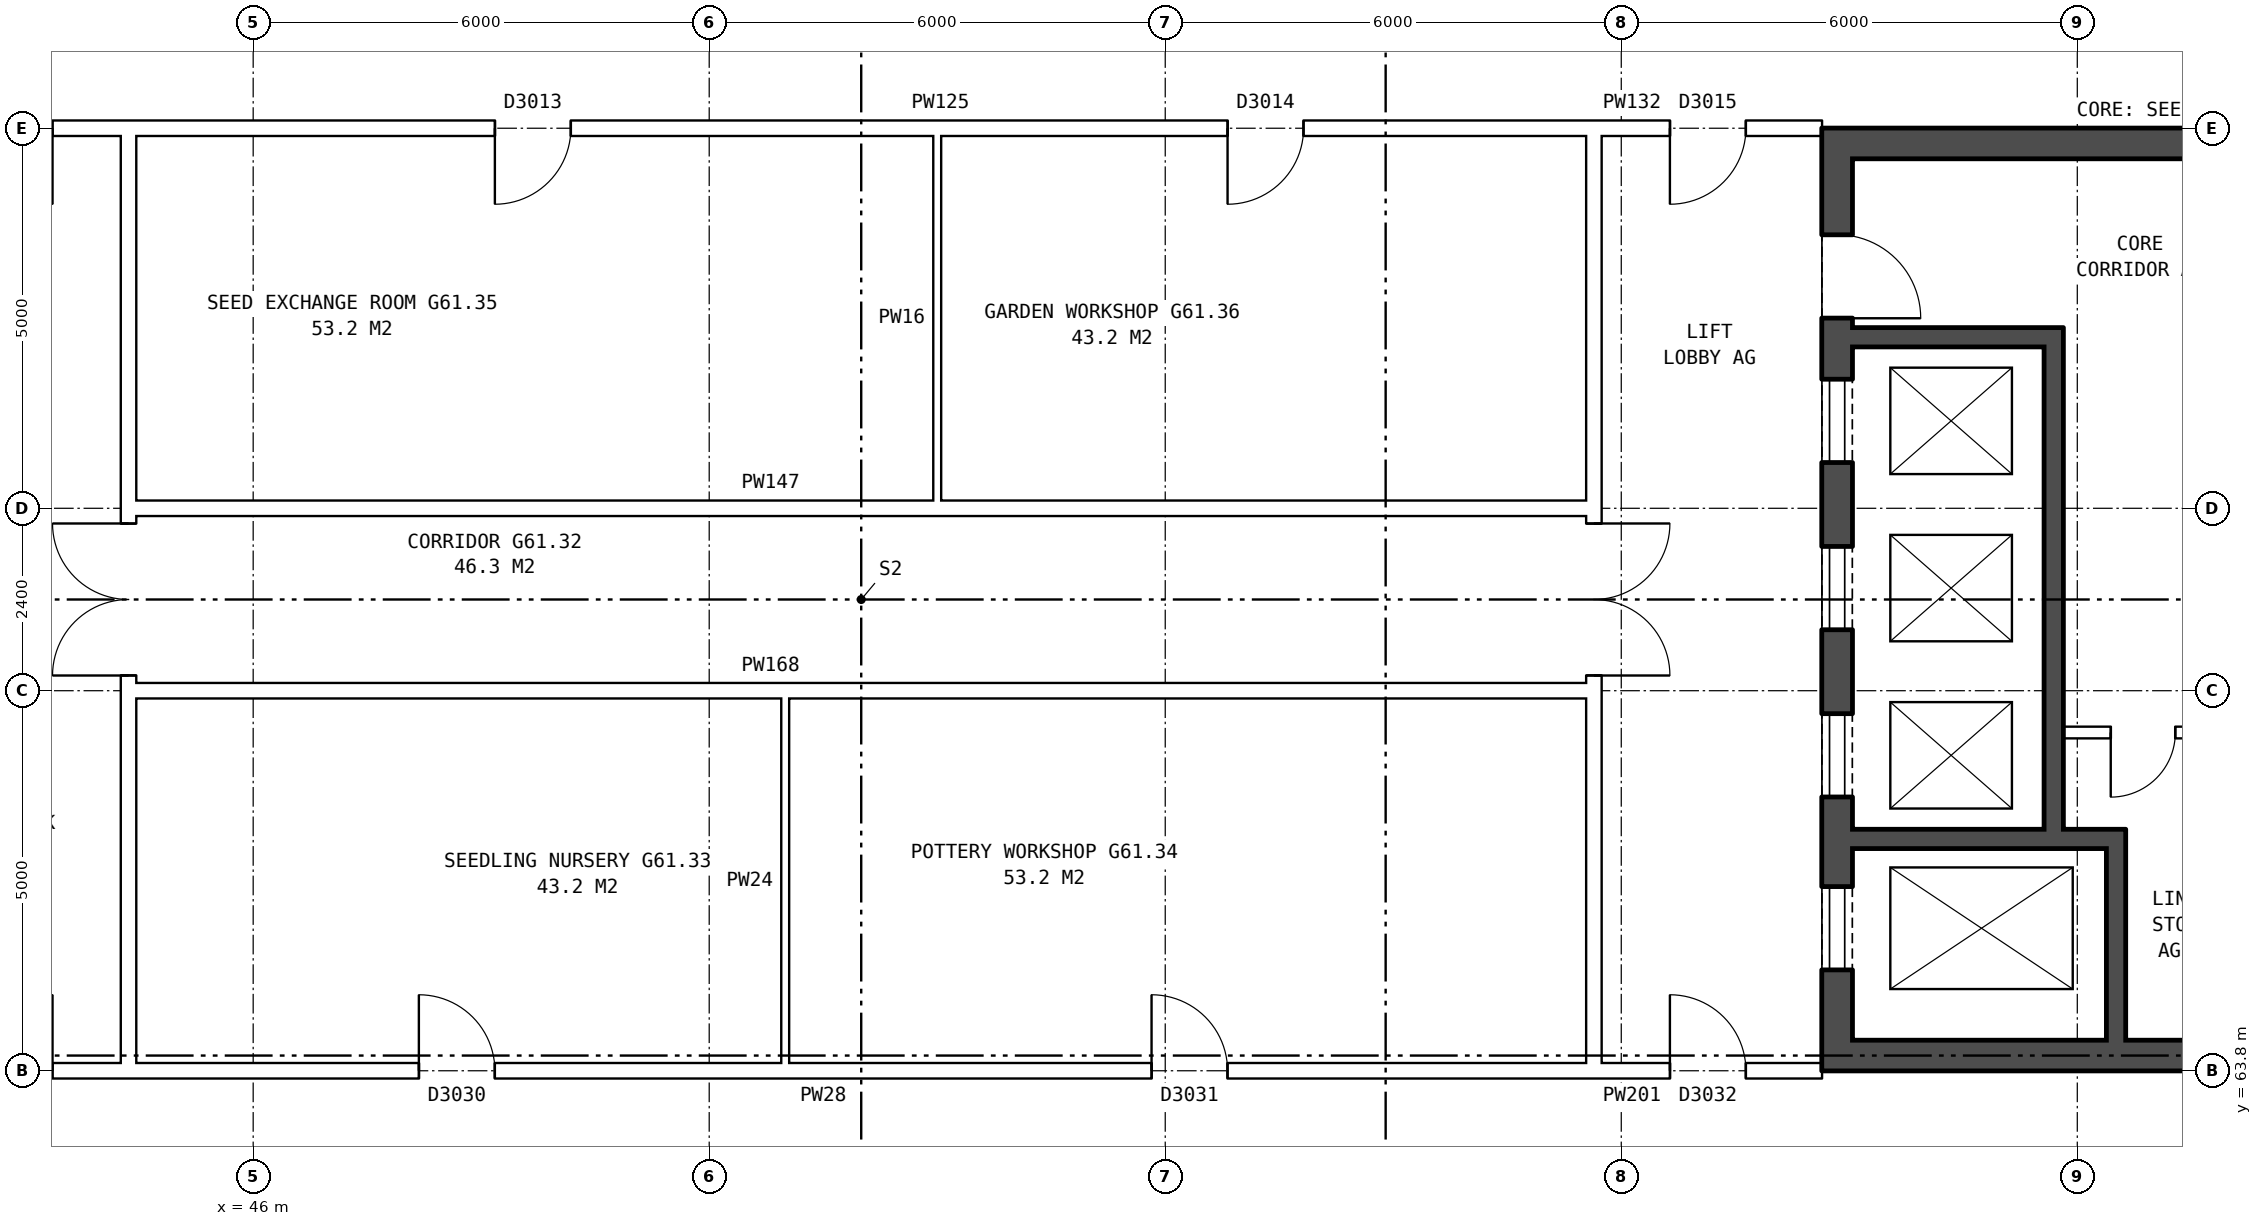
"""IFC4 building model, lengths in metres.
Left out: names, types, materials, properties, quantities, classifications, styles, units other than length and angle.
Written with IfcOpenShell. Run it as: python <this file> out.ifc"""

import sys

from ifc_helpers import new_model, si_unit, direction, frame, frame_2d, origin, place, context, subcontext, project, spatial, rectangle, extrude, element, fill, save


model = new_model("IFC4")
c1 = context("Model", 3, precision=1e-05, world=origin(), true_north=direction((0.0, 1.0)))
c2 = subcontext(c1, "Body", "Model", "MODEL_VIEW")
j1 = project(units=[si_unit("LENGTHUNIT", "METRE"), si_unit("PLANEANGLEUNIT", "RADIAN")], contexts=[c1])
p1 = place(None, origin())
s1 = spatial("IfcSite", under=j1, at=p1, CompositionType="ELEMENT")
p2 = place(p1, origin())
s2 = spatial("IfcBuilding", under=s1, at=p2, CompositionType="ELEMENT")
p3 = place(p2, frame((0.0, 0.0, 215.2)))
s3 = spatial("IfcBuildingStorey", under=s2, at=p3, CompositionType="ELEMENT", Elevation=215.2)
p4 = place(p3, frame((66.84, 63.8, 0.0), z_axis=(0.0, 0.0, 1.0), x_axis=(0.0, 1.0, 0.0)))
e1 = element("IfcWall", 1, at=p4, inside=s3, PredefinedType="SHEAR", context=c2, shape_type="SweptSolid", body=[
    extrude(rectangle(XDim=12.4, YDim=0.4, at=frame_2d((6.2, 0.0))), origin(), (0.0, 0.0, 1.0), 5.6),
])
p5 = place(p4, frame((1.325, 0.0, 0.0)))
e2 = element("IfcOpeningElement", 2, at=p5, cuts=e1, PredefinedType="OPENING", context=c2, shape_type="SweptSolid", body=[
    extrude(rectangle(XDim=1.1, YDim=2.1, at=frame_2d((0.55, 1.05))), frame((0.0, 0.21, 0.0), z_axis=(0.0, -1.0, 0.0), x_axis=(1.0, 0.0, 0.0)), (0.0, 0.0, 1.0), 0.42),
])
p6 = place(p4, frame((3.6, 0.0, 0.0)))
e3 = element("IfcOpeningElement", 3, at=p6, cuts=e1, PredefinedType="OPENING", context=c2, shape_type="SweptSolid", body=[
    extrude(rectangle(XDim=1.1, YDim=2.1, at=frame_2d((0.55, 1.05))), frame((0.0, 0.21, 0.0), z_axis=(0.0, -1.0, 0.0), x_axis=(1.0, 0.0, 0.0)), (0.0, 0.0, 1.0), 0.42),
])
p7 = place(p4, frame((5.8, 0.0, 0.0)))
e4 = element("IfcOpeningElement", 4, at=p7, cuts=e1, PredefinedType="OPENING", context=c2, shape_type="SweptSolid", body=[
    extrude(rectangle(XDim=1.1, YDim=2.1, at=frame_2d((0.55, 1.05))), frame((0.0, 0.21, 0.0), z_axis=(0.0, -1.0, 0.0), x_axis=(1.0, 0.0, 0.0)), (0.0, 0.0, 1.0), 0.42),
])
p8 = place(p4, frame((8.0, 0.0, 0.0)))
e5 = element("IfcOpeningElement", 5, at=p8, cuts=e1, PredefinedType="OPENING", context=c2, shape_type="SweptSolid", body=[
    extrude(rectangle(XDim=1.1, YDim=2.1, at=frame_2d((0.55, 1.05))), frame((0.0, 0.21, 0.0), z_axis=(0.0, -1.0, 0.0), x_axis=(1.0, 0.0, 0.0)), (0.0, 0.0, 1.0), 0.42),
])
p9 = place(p4, frame((9.9, 0.0, 0.0)))
e6 = element("IfcOpeningElement", 6, at=p9, cuts=e1, PredefinedType="OPENING", context=c2, shape_type="SweptSolid", body=[
    extrude(rectangle(XDim=1.1, YDim=2.1, at=frame_2d((0.55, 1.05))), frame((0.0, 0.21, 0.0), z_axis=(0.0, -1.0, 0.0), x_axis=(1.0, 0.0, 0.0)), (0.0, 0.0, 1.0), 0.42),
])
for number, where, z_axis, x_axis in (
    (7, (67.04, 64.0, 0.0), (0.0, 0.0, 1.0), (1.0, 0.0, 0.0)),
    (8, (67.04, 76.0, 0.0), (0.0, 0.0, 1.0), (1.0, 0.0, 0.0)),
):
    element("IfcWall", number, at=place(p3, frame(where, z_axis=z_axis, x_axis=x_axis)), inside=s3, PredefinedType="SHEAR", context=c2, shape_type="SweptSolid", body=[
        extrude(rectangle(XDim=8.2, YDim=0.4, at=frame_2d((4.1, 0.0))), origin(), (0.0, 0.0, 1.0), 5.6),
    ])
p10 = place(p3, frame((67.04, 66.85, 0.0), z_axis=(0.0, 0.0, 1.0), x_axis=(1.0, 0.0, 0.0)))
e9 = element("IfcWall", 9, at=p10, inside=s3, PredefinedType="SHEAR", context=c2, shape_type="SweptSolid", body=[
    extrude(rectangle(XDim=3.595, YDim=0.25, at=frame_2d((1.797, 0.0))), origin(), (0.0, 0.0, 1.0), 5.6),
])
p11 = place(p3, frame((69.815, 68.25, 0.0), z_axis=(0.0, 0.0, 1.0), x_axis=(1.0, 0.0, 0.0)))
e10 = element("IfcWall", 10, at=p11, inside=s3, PredefinedType="PARTITIONING", context=c2, shape_type="SweptSolid", body=[
    extrude(rectangle(XDim=2.1, YDim=0.15, at=frame_2d((1.05, 0.0))), origin(), (0.0, 0.0, 1.0), 5.6),
])
p12 = place(p11, frame((0.625, 0.0, 0.0)))
e11 = element("IfcOpeningElement", 11, at=p12, cuts=e10, PredefinedType="OPENING", context=c2, shape_type="SweptSolid", body=[
    extrude(rectangle(XDim=0.85, YDim=2.1, at=frame_2d((0.425, 1.05))), frame((0.0, 0.085, 0.0), z_axis=(0.0, -1.0, 0.0), x_axis=(1.0, 0.0, 0.0)), (0.0, 0.0, 1.0), 0.17),
])
p13 = place(p3, frame((67.04, 73.45, 0.0), z_axis=(0.0, 0.0, 1.0), x_axis=(1.0, 0.0, 0.0)))
e12 = element("IfcWall", 12, at=p13, inside=s3, PredefinedType="SHEAR", context=c2, shape_type="SweptSolid", body=[
    extrude(rectangle(XDim=2.525, YDim=0.25, at=frame_2d((1.262, 0.0))), origin(), (0.0, 0.0, 1.0), 5.6),
])
p14 = place(p3, frame((69.69, 66.975, 0.0), z_axis=(0.0, 0.0, 1.0), x_axis=(0.0, 1.0, 0.0)))
e13 = element("IfcWall", 13, at=p14, inside=s3, PredefinedType="SHEAR", context=c2, shape_type="SweptSolid", body=[
    extrude(rectangle(XDim=6.6, YDim=0.25, at=frame_2d((3.3, 0.0))), origin(), (0.0, 0.0, 1.0), 5.6),
])
p15 = place(p3, frame((70.51, 64.2, 0.0), z_axis=(0.0, 0.0, 1.0), x_axis=(0.0, 1.0, 0.0)))
e14 = element("IfcWall", 14, at=p15, inside=s3, PredefinedType="SHEAR", context=c2, shape_type="SweptSolid", body=[
    extrude(rectangle(XDim=2.525, YDim=0.25, at=frame_2d((1.263, 0.0))), origin(), (0.0, 0.0, 1.0), 5.6),
])
p16 = place(p3, frame((63.64, 63.9, 0.0), z_axis=(0.0, 0.0, 1.0), x_axis=(0.0, 1.0, 0.0)))
e15 = element("IfcWall", 15, at=p16, inside=s3, PredefinedType="PARTITIONING", context=c2, shape_type="SweptSolid", body=[
    extrude(rectangle(XDim=12.2, YDim=0.2, at=frame_2d((6.1, 0.0))), origin(), (0.0, 0.0, 1.0), 5.6),
])
p17 = place(p16, frame((5.1, 0.0, 0.0)))
e16 = element("IfcOpeningElement", 16, at=p17, cuts=e15, PredefinedType="OPENING", context=c2, shape_type="SweptSolid", body=[
    extrude(rectangle(XDim=2.0, YDim=2.1, at=frame_2d((1.0, 1.05))), frame((0.0, 0.11, 0.0), z_axis=(0.0, -1.0, 0.0), x_axis=(1.0, 0.0, 0.0)), (0.0, 0.0, 1.0), 0.22),
])
p18 = place(p3, frame((44.36, 63.9, 0.0), z_axis=(0.0, 0.0, 1.0), x_axis=(0.0, 1.0, 0.0)))
e17 = element("IfcWall", 17, at=p18, inside=s3, PredefinedType="PARTITIONING", context=c2, shape_type="SweptSolid", body=[
    extrude(rectangle(XDim=12.2, YDim=0.2, at=frame_2d((6.1, 0.0))), origin(), (0.0, 0.0, 1.0), 5.6),
])
p19 = place(p18, frame((5.1, 0.0, 0.0)))
e18 = element("IfcOpeningElement", 18, at=p19, cuts=e17, PredefinedType="OPENING", context=c2, shape_type="SweptSolid", body=[
    extrude(rectangle(XDim=2.0, YDim=2.1, at=frame_2d((1.0, 1.05))), frame((0.0, 0.11, 0.0), z_axis=(0.0, -1.0, 0.0), x_axis=(1.0, 0.0, 0.0)), (0.0, 0.0, 1.0), 0.22),
])
p20 = place(p3, frame((44.36, 63.8, 0.0), z_axis=(0.0, 0.0, 1.0), x_axis=(1.0, 0.0, 0.0)))
e19 = element("IfcWall", 19, at=p20, inside=s3, PredefinedType="PARTITIONING", context=c2, shape_type="SweptSolid", body=[
    extrude(rectangle(XDim=19.28, YDim=0.2, at=frame_2d((9.64, 0.0))), origin(), (0.0, 0.0, 1.0), 5.6),
])
p21 = place(p20, frame((3.82, 0.0, 0.0)))
e20 = element("IfcOpeningElement", 20, at=p21, cuts=e19, PredefinedType="OPENING", context=c2, shape_type="SweptSolid", body=[
    extrude(rectangle(XDim=1.0, YDim=2.1, at=frame_2d((0.5, 1.05))), frame((0.0, 0.11, 0.0), z_axis=(0.0, -1.0, 0.0), x_axis=(1.0, 0.0, 0.0)), (0.0, 0.0, 1.0), 0.22),
])
p22 = place(p20, frame((13.46, 0.0, 0.0)))
e21 = element("IfcOpeningElement", 21, at=p22, cuts=e19, PredefinedType="OPENING", context=c2, shape_type="SweptSolid", body=[
    extrude(rectangle(XDim=1.0, YDim=2.1, at=frame_2d((0.5, 1.05))), frame((0.0, 0.11, 0.0), z_axis=(0.0, -1.0, 0.0), x_axis=(1.0, 0.0, 0.0)), (0.0, 0.0, 1.0), 0.22),
])
p23 = place(p3, frame((41.36, 63.8, 0.0), z_axis=(0.0, 0.0, 1.0), x_axis=(1.0, 0.0, 0.0)))
e22 = element("IfcWall", 22, at=p23, inside=s3, PredefinedType="PARTITIONING", context=c2, shape_type="SweptSolid", body=[
    extrude(rectangle(XDim=3.0, YDim=0.2, at=frame_2d((1.5, 0.0))), origin(), (0.0, 0.0, 1.0), 5.6),
])
p24 = place(p23, frame((1.0, 0.0, 0.0)))
e23 = element("IfcOpeningElement", 23, at=p24, cuts=e22, PredefinedType="OPENING", context=c2, shape_type="SweptSolid", body=[
    extrude(rectangle(XDim=1.0, YDim=2.1, at=frame_2d((0.5, 1.05))), frame((0.0, 0.11, 0.0), z_axis=(0.0, -1.0, 0.0), x_axis=(1.0, 0.0, 0.0)), (0.0, 0.0, 1.0), 0.22),
])
p25 = place(p3, frame((63.64, 63.8, 0.0), z_axis=(0.0, 0.0, 1.0), x_axis=(1.0, 0.0, 0.0)))
e24 = element("IfcWall", 24, at=p25, inside=s3, PredefinedType="PARTITIONING", context=c2, shape_type="SweptSolid", body=[
    extrude(rectangle(XDim=3.0, YDim=0.2, at=frame_2d((1.5, 0.0))), origin(), (0.0, 0.0, 1.0), 5.6),
])
p26 = place(p25, frame((1.0, 0.0, 0.0)))
e25 = element("IfcOpeningElement", 25, at=p26, cuts=e24, PredefinedType="OPENING", context=c2, shape_type="SweptSolid", body=[
    extrude(rectangle(XDim=1.0, YDim=2.1, at=frame_2d((0.5, 1.05))), frame((0.0, 0.11, 0.0), z_axis=(0.0, -1.0, 0.0), x_axis=(1.0, 0.0, 0.0)), (0.0, 0.0, 1.0), 0.22),
])
for number, where, z_axis, x_axis in (
    (26, (44.36, 68.8, 0.0), (0.0, 0.0, 1.0), (1.0, 0.0, 0.0)),
    (27, (44.36, 71.2, 0.0), (0.0, 0.0, 1.0), (1.0, 0.0, 0.0)),
):
    element("IfcWall", number, at=place(p3, frame(where, z_axis=z_axis, x_axis=x_axis)), inside=s3, PredefinedType="PARTITIONING", context=c2, shape_type="SweptSolid", body=[
        extrude(rectangle(XDim=19.28, YDim=0.2, at=frame_2d((9.64, 0.0))), origin(), (0.0, 0.0, 1.0), 5.6),
    ])
p27 = place(p3, frame((44.36, 76.2, 0.0), z_axis=(0.0, 0.0, 1.0), x_axis=(1.0, 0.0, 0.0)))
e28 = element("IfcWall", 28, at=p27, inside=s3, PredefinedType="PARTITIONING", context=c2, shape_type="SweptSolid", body=[
    extrude(rectangle(XDim=19.28, YDim=0.2, at=frame_2d((9.64, 0.0))), origin(), (0.0, 0.0, 1.0), 5.6),
])
p28 = place(p27, frame((4.82, 0.0, 0.0)))
e29 = element("IfcOpeningElement", 29, at=p28, cuts=e28, PredefinedType="OPENING", context=c2, shape_type="SweptSolid", body=[
    extrude(rectangle(XDim=1.0, YDim=2.1, at=frame_2d((0.5, 1.05))), frame((0.0, 0.11, 0.0), z_axis=(0.0, -1.0, 0.0), x_axis=(1.0, 0.0, 0.0)), (0.0, 0.0, 1.0), 0.22),
])
p29 = place(p27, frame((14.46, 0.0, 0.0)))
e30 = element("IfcOpeningElement", 30, at=p29, cuts=e28, PredefinedType="OPENING", context=c2, shape_type="SweptSolid", body=[
    extrude(rectangle(XDim=1.0, YDim=2.1, at=frame_2d((0.5, 1.05))), frame((0.0, 0.11, 0.0), z_axis=(0.0, -1.0, 0.0), x_axis=(1.0, 0.0, 0.0)), (0.0, 0.0, 1.0), 0.22),
])
p30 = place(p3, frame((41.36, 76.2, 0.0), z_axis=(0.0, 0.0, 1.0), x_axis=(1.0, 0.0, 0.0)))
e31 = element("IfcWall", 31, at=p30, inside=s3, PredefinedType="PARTITIONING", context=c2, shape_type="SweptSolid", body=[
    extrude(rectangle(XDim=3.0, YDim=0.2, at=frame_2d((1.5, 0.0))), origin(), (0.0, 0.0, 1.0), 5.6),
])
p31 = place(p30, frame((1.0, 0.0, 0.0)))
e32 = element("IfcOpeningElement", 32, at=p31, cuts=e31, PredefinedType="OPENING", context=c2, shape_type="SweptSolid", body=[
    extrude(rectangle(XDim=1.0, YDim=2.1, at=frame_2d((0.5, 1.05))), frame((0.0, 0.11, 0.0), z_axis=(0.0, -1.0, 0.0), x_axis=(1.0, 0.0, 0.0)), (0.0, 0.0, 1.0), 0.22),
])
p32 = place(p3, frame((63.64, 76.2, 0.0), z_axis=(0.0, 0.0, 1.0), x_axis=(1.0, 0.0, 0.0)))
e33 = element("IfcWall", 33, at=p32, inside=s3, PredefinedType="PARTITIONING", context=c2, shape_type="SweptSolid", body=[
    extrude(rectangle(XDim=3.0, YDim=0.2, at=frame_2d((1.5, 0.0))), origin(), (0.0, 0.0, 1.0), 5.6),
])
p33 = place(p32, frame((1.0, 0.0, 0.0)))
e34 = element("IfcOpeningElement", 34, at=p33, cuts=e33, PredefinedType="OPENING", context=c2, shape_type="SweptSolid", body=[
    extrude(rectangle(XDim=1.0, YDim=2.1, at=frame_2d((0.5, 1.05))), frame((0.0, 0.11, 0.0), z_axis=(0.0, -1.0, 0.0), x_axis=(1.0, 0.0, 0.0)), (0.0, 0.0, 1.0), 0.22),
])
for number, where, z_axis, x_axis in (
    (35, (53.0, 63.7, 0.0), (0.0, 0.0, 1.0), (0.0, 1.0, 0.0)),
    (36, (55.0, 71.1, 0.0), (0.0, 0.0, 1.0), (0.0, 1.0, 0.0)),
):
    element("IfcWall", number, at=place(p3, frame(where, z_axis=z_axis, x_axis=x_axis)), inside=s3, PredefinedType="PARTITIONING", context=c2, shape_type="SweptSolid", body=[
        extrude(rectangle(XDim=5.2, YDim=0.1, at=frame_2d((2.6, 0.0))), origin(), (0.0, 0.0, 1.0), 5.6),
    ])
p34 = place(p5, origin())
e37 = element("IfcDoor", 37, at=p34, inside=s3, OperationType="DOUBLE_DOOR_SLIDING", PredefinedType="DOOR", context=c2, shape_type="SweptSolid", body=[
    extrude(rectangle(XDim=1.1, YDim=2.1, at=frame_2d((0.55, 1.05))), frame((0.0, -0.135, 0.0), z_axis=(0.0, -1.0, 0.0), x_axis=(1.0, 0.0, 0.0)), (0.0, 0.0, 1.0), 0.05),
])
fill(e2, e37)
p35 = place(p6, origin())
e38 = element("IfcDoor", 38, at=p35, inside=s3, OperationType="DOUBLE_DOOR_SLIDING", PredefinedType="DOOR", context=c2, shape_type="SweptSolid", body=[
    extrude(rectangle(XDim=1.1, YDim=2.1, at=frame_2d((0.55, 1.05))), frame((0.0, -0.135, 0.0), z_axis=(0.0, -1.0, 0.0), x_axis=(1.0, 0.0, 0.0)), (0.0, 0.0, 1.0), 0.05),
])
fill(e3, e38)
p36 = place(p7, origin())
e39 = element("IfcDoor", 39, at=p36, inside=s3, OperationType="DOUBLE_DOOR_SLIDING", PredefinedType="DOOR", context=c2, shape_type="SweptSolid", body=[
    extrude(rectangle(XDim=1.1, YDim=2.1, at=frame_2d((0.55, 1.05))), frame((0.0, -0.135, 0.0), z_axis=(0.0, -1.0, 0.0), x_axis=(1.0, 0.0, 0.0)), (0.0, 0.0, 1.0), 0.05),
])
fill(e4, e39)
p37 = place(p8, origin())
e40 = element("IfcDoor", 40, at=p37, inside=s3, OperationType="DOUBLE_DOOR_SLIDING", PredefinedType="DOOR", context=c2, shape_type="SweptSolid", body=[
    extrude(rectangle(XDim=1.1, YDim=2.1, at=frame_2d((0.55, 1.05))), frame((0.0, -0.135, 0.0), z_axis=(0.0, -1.0, 0.0), x_axis=(1.0, 0.0, 0.0)), (0.0, 0.0, 1.0), 0.05),
])
fill(e5, e40)
p38 = place(p9, frame((1.1, 0.0, 0.0), z_axis=(0.0, 0.0, 1.0), x_axis=(-1.0, 0.0, 0.0)))
e41 = element("IfcDoor", 41, at=p38, inside=s3, OperationType="SINGLE_SWING_RIGHT", PredefinedType="DOOR", context=c2, shape_type="SweptSolid", body=[
    extrude(rectangle(XDim=1.1, YDim=2.1, at=frame_2d((0.55, 1.05))), frame((0.0, 0.185, 0.0), z_axis=(0.0, -1.0, 0.0), x_axis=(1.0, 0.0, 0.0)), (0.0, 0.0, 1.0), 0.05),
])
fill(e6, e41)
p39 = place(p12, frame((0.85, 0.0, 0.0), z_axis=(0.0, 0.0, 1.0), x_axis=(-1.0, 0.0, 0.0)))
e42 = element("IfcDoor", 42, at=p39, inside=s3, OperationType="SINGLE_SWING_RIGHT", PredefinedType="DOOR", context=c2, shape_type="SweptSolid", body=[
    extrude(rectangle(XDim=0.85, YDim=2.1, at=frame_2d((0.425, 1.05))), frame((0.0, 0.025, 0.0), z_axis=(0.0, -1.0, 0.0), x_axis=(1.0, 0.0, 0.0)), (0.0, 0.0, 1.0), 0.05),
])
fill(e11, e42)
p40 = place(p17, frame((2.0, 0.0, 0.0), z_axis=(0.0, 0.0, 1.0), x_axis=(-1.0, 0.0, 0.0)))
e43 = element("IfcDoor", 43, at=p40, inside=s3, OperationType="DOUBLE_DOOR_SINGLE_SWING", PredefinedType="DOOR", context=c2, shape_type="SweptSolid", body=[
    extrude(rectangle(XDim=2.0, YDim=2.1, at=frame_2d((1.0, 1.05))), frame((0.0, 0.025, 0.0), z_axis=(0.0, -1.0, 0.0), x_axis=(1.0, 0.0, 0.0)), (0.0, 0.0, 1.0), 0.05),
])
fill(e16, e43)
p41 = place(p19, origin())
e44 = element("IfcDoor", 44, at=p41, inside=s3, OperationType="DOUBLE_DOOR_SINGLE_SWING", PredefinedType="DOOR", context=c2, shape_type="SweptSolid", body=[
    extrude(rectangle(XDim=2.0, YDim=2.1, at=frame_2d((1.0, 1.05))), frame((0.0, 0.025, 0.0), z_axis=(0.0, -1.0, 0.0), x_axis=(1.0, 0.0, 0.0)), (0.0, 0.0, 1.0), 0.05),
])
fill(e18, e44)
p42 = place(p21, origin())
e45 = element("IfcDoor", 45, at=p42, inside=s3, OperationType="SINGLE_SWING_LEFT", PredefinedType="DOOR", context=c2, shape_type="SweptSolid", body=[
    extrude(rectangle(XDim=1.0, YDim=2.1, at=frame_2d((0.5, 1.05))), frame((0.0, 0.025, 0.0), z_axis=(0.0, -1.0, 0.0), x_axis=(1.0, 0.0, 0.0)), (0.0, 0.0, 1.0), 0.05),
])
fill(e20, e45)
p43 = place(p22, origin())
e46 = element("IfcDoor", 46, at=p43, inside=s3, OperationType="SINGLE_SWING_LEFT", PredefinedType="DOOR", context=c2, shape_type="SweptSolid", body=[
    extrude(rectangle(XDim=1.0, YDim=2.1, at=frame_2d((0.5, 1.05))), frame((0.0, 0.025, 0.0), z_axis=(0.0, -1.0, 0.0), x_axis=(1.0, 0.0, 0.0)), (0.0, 0.0, 1.0), 0.05),
])
fill(e21, e46)
p44 = place(p26, origin())
e47 = element("IfcDoor", 47, at=p44, inside=s3, OperationType="SINGLE_SWING_LEFT", PredefinedType="DOOR", context=c2, shape_type="SweptSolid", body=[
    extrude(rectangle(XDim=1.0, YDim=2.1, at=frame_2d((0.5, 1.05))), frame((0.0, 0.025, 0.0), z_axis=(0.0, -1.0, 0.0), x_axis=(1.0, 0.0, 0.0)), (0.0, 0.0, 1.0), 0.05),
])
fill(e25, e47)
p45 = place(p28, frame((1.0, 0.0, 0.0), z_axis=(0.0, 0.0, 1.0), x_axis=(-1.0, 0.0, 0.0)))
e48 = element("IfcDoor", 48, at=p45, inside=s3, OperationType="SINGLE_SWING_RIGHT", PredefinedType="DOOR", context=c2, shape_type="SweptSolid", body=[
    extrude(rectangle(XDim=1.0, YDim=2.1, at=frame_2d((0.5, 1.05))), frame((0.0, 0.025, 0.0), z_axis=(0.0, -1.0, 0.0), x_axis=(1.0, 0.0, 0.0)), (0.0, 0.0, 1.0), 0.05),
])
fill(e29, e48)
p46 = place(p29, frame((1.0, 0.0, 0.0), z_axis=(0.0, 0.0, 1.0), x_axis=(-1.0, 0.0, 0.0)))
e49 = element("IfcDoor", 49, at=p46, inside=s3, OperationType="SINGLE_SWING_RIGHT", PredefinedType="DOOR", context=c2, shape_type="SweptSolid", body=[
    extrude(rectangle(XDim=1.0, YDim=2.1, at=frame_2d((0.5, 1.05))), frame((0.0, 0.025, 0.0), z_axis=(0.0, -1.0, 0.0), x_axis=(1.0, 0.0, 0.0)), (0.0, 0.0, 1.0), 0.05),
])
fill(e30, e49)
p47 = place(p33, frame((1.0, 0.0, 0.0), z_axis=(0.0, 0.0, 1.0), x_axis=(-1.0, 0.0, 0.0)))
e50 = element("IfcDoor", 50, at=p47, inside=s3, OperationType="SINGLE_SWING_RIGHT", PredefinedType="DOOR", context=c2, shape_type="SweptSolid", body=[
    extrude(rectangle(XDim=1.0, YDim=2.1, at=frame_2d((0.5, 1.05))), frame((0.0, 0.025, 0.0), z_axis=(0.0, -1.0, 0.0), x_axis=(1.0, 0.0, 0.0)), (0.0, 0.0, 1.0), 0.05),
])
fill(e34, e50)
save(model, sys.argv[1])
